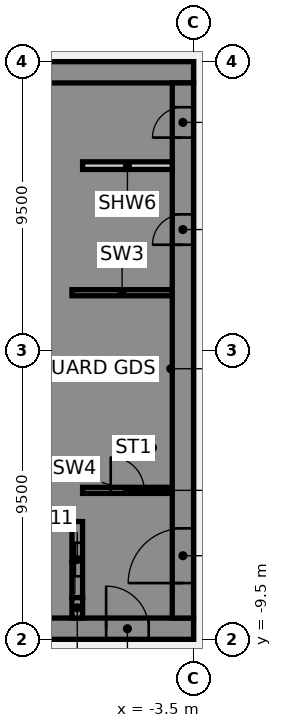
"""IFC4 building model, lengths in metres.
Left out: names, types, materials, properties, quantities, classifications, styles, units other than length and angle.
Written with IfcOpenShell. Run it as: python <this file> out.ifc"""

import sys

from ifc_helpers import new_model, si_unit, direction, frame, frame_2d, origin, place, context, subcontext, project, spatial, polyline, rectangle, outline, extrude, element, fill, save


model = new_model("IFC4")
c1 = context("Model", 3, precision=1e-05, world=origin(), true_north=direction((0.0, 1.0)))
c2 = subcontext(c1, "Body", "Model", "MODEL_VIEW")
j1 = project(units=[si_unit("LENGTHUNIT", "METRE"), si_unit("PLANEANGLEUNIT", "RADIAN")], contexts=[c1])
p1 = place(None, origin())
s1 = spatial("IfcSite", under=j1, at=p1, CompositionType="ELEMENT")
p2 = place(p1, origin())
s2 = spatial("IfcBuilding", under=s1, at=p2, CompositionType="ELEMENT")
p3 = place(p2, frame((0.0, 0.0, 52.75)))
s3 = spatial("IfcBuildingStorey", under=s2, at=p3, CompositionType="ELEMENT", Elevation=52.75)
p4 = place(p3, frame((-16.5, -9.15, 0.0), z_axis=(0.0, 0.0, 1.0), x_axis=(1.0, 0.0, 0.0)))
e1 = element("IfcWall", 1, at=p4, inside=s3, PredefinedType="SHEAR", context=c2, shape_type="SweptSolid", body=[
    extrude(rectangle(XDim=13.0, YDim=0.7, at=frame_2d((6.5, 0.0))), origin(), (0.0, 0.0, 1.0), 3.61),
])
p5 = place(p4, frame((4.15, 0.0, 0.0)))
e2 = element("IfcOpeningElement", 2, at=p5, cuts=e1, PredefinedType="OPENING", context=c2, shape_type="SweptSolid", body=[
    extrude(rectangle(XDim=1.4, YDim=2.1, at=frame_2d((0.7, 1.05))), frame((0.0, 0.36, 0.0), z_axis=(0.0, -1.0, 0.0), x_axis=(1.0, 0.0, 0.0)), (0.0, 0.0, 1.0), 0.72),
])
p6 = place(p4, frame((10.125, 0.0, 0.0)))
e3 = element("IfcOpeningElement", 3, at=p6, cuts=e1, PredefinedType="OPENING", context=c2, shape_type="SweptSolid", body=[
    extrude(rectangle(XDim=1.4, YDim=2.1, at=frame_2d((0.7, 1.05))), frame((0.0, 0.36, 0.0), z_axis=(0.0, -1.0, 0.0), x_axis=(1.0, 0.0, 0.0)), (0.0, 0.0, 1.0), 0.72),
])
p7 = place(p3, frame((-16.5, 9.15, 0.0), z_axis=(0.0, 0.0, 1.0), x_axis=(1.0, 0.0, 0.0)))
e4 = element("IfcWall", 4, at=p7, inside=s3, PredefinedType="SHEAR", context=c2, shape_type="SweptSolid", body=[
    extrude(rectangle(XDim=13.0, YDim=0.7, at=frame_2d((6.5, 0.0))), origin(), (0.0, 0.0, 1.0), 3.61),
])
p8 = place(p3, origin())
e5 = element("IfcWall", 5, at=p8, inside=s3, PredefinedType="SHEAR", context=c2, shape_type="SweptSolid", body=[
    extrude(outline(polyline([(-9.8, -5.375), (-9.8, -5.625), (-7.5, -5.625), (-7.15, -5.625), (-7.15, 8.8), (-7.5, 8.8), (-9.8, 8.8), (-9.8, 8.125), (-7.5, 8.125), (-7.5, 5.625), (-9.8, 5.625), (-9.8, 5.375), (-7.5, 5.375), (-7.5, 2.875), (-9.8, 2.875), (-9.8, 2.625), (-7.5, 2.625), (-7.5, 0.125), (-9.8, 0.125), (-9.8, -0.125), (-7.5, -0.125), (-7.5, -2.625), (-9.8, -2.625), (-9.8, -2.875), (-7.5, -2.875), (-7.5, -5.375), (-9.8, -5.375)])), origin(), (0.0, 0.0, 1.0), 3.61),
])
p9 = place(p3, origin())
e6 = element("IfcWall", 6, at=p9, inside=s3, PredefinedType="SHEAR", context=c2, shape_type="SweptSolid", body=[
    extrude(outline(polyline([(-7.5, -8.125), (-9.55, -8.125), (-9.55, -5.625), (-9.8, -5.625), (-9.8, -8.125), (-9.8, -8.8), (-7.5, -8.8), (-7.5, -8.125)])), origin(), (0.0, 0.0, 1.0), 3.61),
])
p10 = place(p3, frame((-7.325, -8.8, 0.0), z_axis=(0.0, 0.0, 1.0), x_axis=(0.0, 1.0, 0.0)))
e7 = element("IfcWall", 7, at=p10, inside=s3, PredefinedType="SHEAR", context=c2, shape_type="SweptSolid", body=[
    extrude(rectangle(XDim=0.675, YDim=0.35, at=frame_2d((0.337, 0.0))), origin(), (0.0, 0.0, 1.0), 3.61),
])
p11 = place(p3, frame((-7.5, 1.9, 0.0), z_axis=(0.0, 0.0, 1.0), x_axis=(1.0, 0.0, 0.0)))
e8 = element("IfcWall", 8, at=p11, inside=s3, PredefinedType="SHEAR", context=c2, shape_type="SweptSolid", body=[
    extrude(rectangle(XDim=3.3, YDim=0.2, at=frame_2d((1.65, 0.0))), origin(), (0.0, 0.0, 1.0), 3.61),
])
p12 = place(p3, frame((-7.325, -8.125, 0.0), z_axis=(0.0, 0.0, 1.0), x_axis=(0.0, 1.0, 0.0)))
e9 = element("IfcWall", 9, at=p12, inside=s3, PredefinedType="SHEAR", context=c2, shape_type="SweptSolid", body=[
    extrude(rectangle(XDim=2.5, YDim=0.35, at=frame_2d((1.25, 0.0))), origin(), (0.0, 0.0, 1.0), 3.61),
])
p13 = place(p12, frame((0.7, 0.0, 0.0)))
e10 = element("IfcOpeningElement", 10, at=p13, cuts=e9, PredefinedType="OPENING", context=c2, shape_type="SweptSolid", body=[
    extrude(rectangle(XDim=1.1, YDim=2.1, at=frame_2d((0.55, 1.05))), frame((0.0, 0.185, 0.0), z_axis=(0.0, -1.0, 0.0), x_axis=(1.0, 0.0, 0.0)), (0.0, 0.0, 1.0), 0.37),
])
p14 = place(p3, frame((-3.85, -8.8, 0.0), z_axis=(0.0, 0.0, 1.0), x_axis=(0.0, 1.0, 0.0)))
e11 = element("IfcWall", 11, at=p14, inside=s3, PredefinedType="SHEAR", context=c2, shape_type="SweptSolid", body=[
    extrude(rectangle(XDim=17.6, YDim=0.7, at=frame_2d((8.8, 0.0))), origin(), (0.0, 0.0, 1.0), 3.61),
])
p15 = place(p14, frame((1.15, 0.0, 0.0)))
e12 = element("IfcOpeningElement", 12, at=p15, cuts=e11, PredefinedType="OPENING", context=c2, shape_type="SweptSolid", body=[
    extrude(rectangle(XDim=1.8, YDim=2.1, at=frame_2d((0.9, 1.05))), frame((0.0, 0.36, 0.0), z_axis=(0.0, -1.0, 0.0), x_axis=(1.0, 0.0, 0.0)), (0.0, 0.0, 1.0), 0.72),
])
p16 = place(p14, frame((12.278, 0.0, 0.0)))
e13 = element("IfcOpeningElement", 13, at=p16, cuts=e11, PredefinedType="OPENING", context=c2, shape_type="SweptSolid", body=[
    extrude(rectangle(XDim=1.0, YDim=2.1, at=frame_2d((0.5, 1.05))), frame((0.0, 0.36, 0.0), z_axis=(0.0, -1.0, 0.0), x_axis=(1.0, 0.0, 0.0)), (0.0, 0.0, 1.0), 0.72),
])
p17 = place(p14, frame((15.802, 0.0, 0.0)))
e14 = element("IfcOpeningElement", 14, at=p17, cuts=e11, PredefinedType="OPENING", context=c2, shape_type="SweptSolid", body=[
    extrude(rectangle(XDim=1.0, YDim=2.1, at=frame_2d((0.5, 1.05))), frame((0.0, 0.36, 0.0), z_axis=(0.0, -1.0, 0.0), x_axis=(1.0, 0.0, 0.0)), (0.0, 0.0, 1.0), 0.72),
])
p18 = place(p3, frame((-7.15, 6.08, 0.0), z_axis=(0.0, 0.0, 1.0), x_axis=(1.0, 0.0, 0.0)))
e15 = element("IfcWall", 15, at=p18, inside=s3, PredefinedType="PARTITIONING", context=c2, shape_type="SweptSolid", body=[
    extrude(rectangle(XDim=2.95, YDim=0.25, at=frame_2d((1.475, 0.0))), origin(), (0.0, 0.0, 1.0), 3.61),
])
p19 = place(p3, frame((-7.15, -4.6, 0.0), z_axis=(0.0, 0.0, 1.0), x_axis=(1.0, 0.0, 0.0)))
e16 = element("IfcWall", 16, at=p19, inside=s3, PredefinedType="SHEAR", context=c2, shape_type="SweptSolid", body=[
    extrude(rectangle(XDim=2.95, YDim=0.2, at=frame_2d((1.475, 0.0))), origin(), (0.0, 0.0, 1.0), 3.61),
])
p20 = place(p19, frame((0.925, 0.0, 0.0)))
e17 = element("IfcOpeningElement", 17, at=p20, cuts=e16, PredefinedType="OPENING", context=c2, shape_type="SweptSolid", body=[
    extrude(rectangle(XDim=1.1, YDim=2.1, at=frame_2d((0.55, 1.05))), frame((0.0, 0.11, 0.0), z_axis=(0.0, -1.0, 0.0), x_axis=(1.0, 0.0, 0.0)), (0.0, 0.0, 1.0), 0.22),
])
p21 = place(p6, origin())
e18 = element("IfcDoor", 18, at=p21, inside=s3, OperationType="SINGLE_SWING_LEFT", PredefinedType="DOOR", context=c2, shape_type="SweptSolid", body=[
    extrude(rectangle(XDim=1.4, YDim=2.1, at=frame_2d((0.7, 1.05))), frame((0.0, 0.025, 0.0), z_axis=(0.0, -1.0, 0.0), x_axis=(1.0, 0.0, 0.0)), (0.0, 0.0, 1.0), 0.05),
])
fill(e3, e18)
p22 = place(p15, origin())
e19 = element("IfcDoor", 19, at=p22, inside=s3, OperationType="SINGLE_SWING_LEFT", PredefinedType="DOOR", context=c2, shape_type="SweptSolid", body=[
    extrude(rectangle(XDim=1.8, YDim=2.1, at=frame_2d((0.9, 1.05))), frame((0.0, 0.025, 0.0), z_axis=(0.0, -1.0, 0.0), x_axis=(1.0, 0.0, 0.0)), (0.0, 0.0, 1.0), 0.05),
])
fill(e12, e19)
p23 = place(p16, origin())
e20 = element("IfcDoor", 20, at=p23, inside=s3, OperationType="SINGLE_SWING_LEFT", PredefinedType="DOOR", context=c2, shape_type="SweptSolid", body=[
    extrude(rectangle(XDim=1.0, YDim=2.1, at=frame_2d((0.5, 1.05))), frame((0.0, 0.325, 0.0), z_axis=(0.0, -1.0, 0.0), x_axis=(1.0, 0.0, 0.0)), (0.0, 0.0, 1.0), 0.05),
])
fill(e13, e20)
p24 = place(p17, origin())
e21 = element("IfcDoor", 21, at=p24, inside=s3, OperationType="SINGLE_SWING_LEFT", PredefinedType="DOOR", context=c2, shape_type="SweptSolid", body=[
    extrude(rectangle(XDim=1.0, YDim=2.1, at=frame_2d((0.5, 1.05))), frame((0.0, 0.325, 0.0), z_axis=(0.0, -1.0, 0.0), x_axis=(1.0, 0.0, 0.0)), (0.0, 0.0, 1.0), 0.05),
])
fill(e14, e21)
p25 = place(p20, origin())
e22 = element("IfcDoor", 22, at=p25, inside=s3, OperationType="SINGLE_SWING_LEFT", PredefinedType="DOOR", context=c2, shape_type="SweptSolid", body=[
    extrude(rectangle(XDim=1.1, YDim=2.1, at=frame_2d((0.55, 1.05))), frame((0.0, 0.025, 0.0), z_axis=(0.0, -1.0, 0.0), x_axis=(1.0, 0.0, 0.0)), (0.0, 0.0, 1.0), 0.05),
])
fill(e17, e22)
p26 = place(p13, origin())
e23 = element("IfcDoor", 23, at=p26, inside=s3, OperationType="SLIDING_TO_LEFT", PredefinedType="DOOR", context=c2, shape_type="SweptSolid", body=[
    extrude(rectangle(XDim=1.1, YDim=2.1, at=frame_2d((0.55, 1.05))), frame((0.0, 0.025, 0.0), z_axis=(0.0, -1.0, 0.0), x_axis=(1.0, 0.0, 0.0)), (0.0, 0.0, 1.0), 0.05),
])
fill(e10, e23)
save(model, sys.argv[1])
